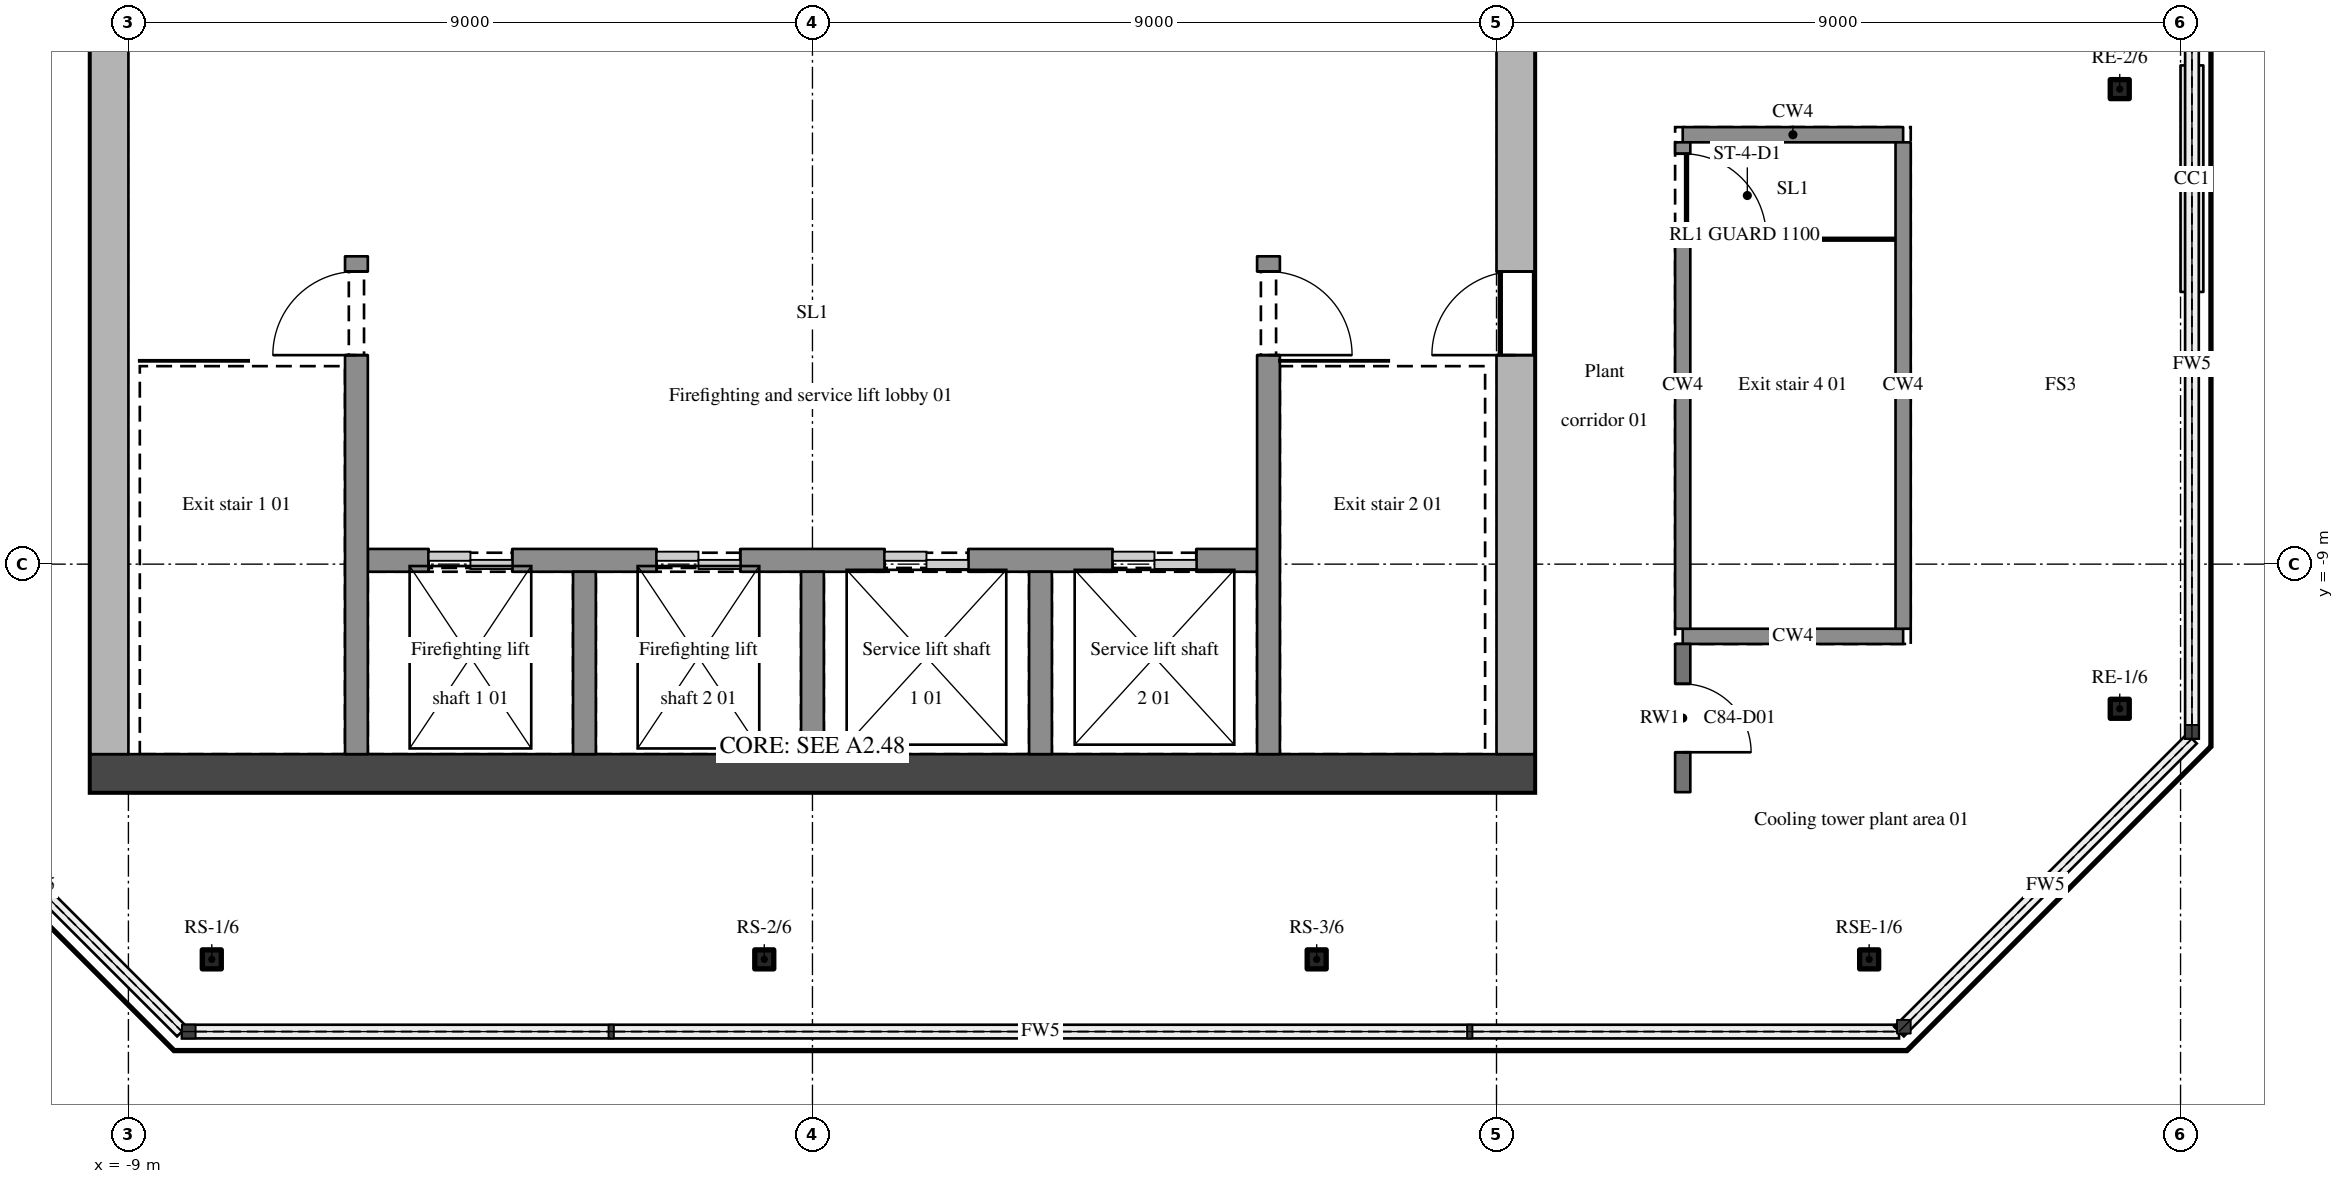
"""IFC4 building model, lengths in metres.
Left out: names, types, materials, properties, quantities, classifications, styles, units other than length and angle.
Written with IfcOpenShell. Run it as: python <this file> out.ifc"""

import sys

from ifc_helpers import new_model, si_unit, direction, frame, frame_2d, origin, origin_2d, place, context, subcontext, project, spatial, polyline, rectangle, hollow_rectangle, outline, extrude, element, fill, save


model = new_model("IFC4")
c1 = context("Model", 3, precision=1e-05, world=origin(), true_north=direction((0.0, 1.0)))
c2 = subcontext(c1, "Body", "Model", "MODEL_VIEW")
j1 = project(units=[si_unit("LENGTHUNIT", "METRE"), si_unit("PLANEANGLEUNIT", "RADIAN")], contexts=[c1])
p1 = place(None, origin())
s1 = spatial("IfcSite", under=j1, at=p1, CompositionType="ELEMENT")
p2 = place(p1, origin())
s2 = spatial("IfcBuilding", under=s1, at=p2, CompositionType="ELEMENT")
p3 = place(p2, frame((0.0, 0.0, 311.7)))
s3 = spatial("IfcBuildingStorey", under=s2, at=p3, CompositionType="ELEMENT", Elevation=311.7)
for number, where, z_axis, x_axis in (
    (1, (-7.903, -14.2, 0.0), (0.0, 0.0, 1.0), (1.0, 0.0, 0.0)),
    (2, (-0.634, -14.2, 0.0), (0.0, 0.0, 1.0), (1.0, 0.0, 0.0)),
    (3, (6.634, -14.2, 0.0), (0.0, 0.0, 1.0), (1.0, 0.0, 0.0)),
    (4, (13.903, -14.2, 0.0), (0.0, 0.0, 1.0), (1.0, 0.0, 0.0)),
    (5, (17.2, -10.903, 0.0), (0.0, 0.0, 1.0), (1.0, 0.0, 0.0)),
):
    element("IfcColumn", number, at=place(p3, frame(where, z_axis=z_axis, x_axis=x_axis)), inside=s3, PredefinedType="COLUMN", context=c2, shape_type="SweptSolid", body=[
        extrude(hollow_rectangle(XDim=0.25, YDim=0.25, WallThickness=0.02, InnerFilletRadius=0.03, OuterFilletRadius=0.05, at=origin_2d()), origin(), (0.0, 0.0, 1.0), 3.6),
    ])
p4 = place(p3, frame((17.2, -2.75, 0.0), z_axis=(0.0, 0.0, 1.0), x_axis=(1.0, 0.0, 0.0)))
e6 = element("IfcColumn", 6, at=p4, inside=s3, PredefinedType="COLUMN", context=c2, shape_type="SweptSolid", body=[
    extrude(hollow_rectangle(XDim=0.25, YDim=0.25, WallThickness=0.02, InnerFilletRadius=0.03, OuterFilletRadius=0.05, at=origin_2d()), origin(), (0.0, 0.0, 1.0), 3.122),
])
p5 = place(p3, frame((-9.5, -11.75, 0.0), z_axis=(0.0, 0.0, 1.0), x_axis=(1.0, 0.0, 0.0)))
e7 = element("IfcWall", 7, at=p5, inside=s3, PredefinedType="SHEAR", context=c2, shape_type="SweptSolid", body=[
    extrude(outline(polyline([(0.0, 0.0), (19.0, 0.0), (19.0, 3.6), (0.0, 3.6), (0.0, 0.0)])), frame((0.0, 0.25, 0.0), z_axis=(0.0, -1.0, 0.0), x_axis=(1.0, 0.0, 0.0)), (0.0, 0.0, 1.0), 0.5),
])
p6 = place(p3, frame((-9.25, -11.5, 0.0), z_axis=(0.0, 0.0, 1.0), x_axis=(0.0, 1.0, 0.0)))
e8 = element("IfcWall", 8, at=p6, inside=s3, PredefinedType="SHEAR", context=c2, shape_type="SweptSolid", body=[
    extrude(outline(polyline([(0.0, 0.0), (11.65, 0.0), (11.65, 0.657), (8.188, 3.6), (0.0, 3.6), (0.0, 0.0)])), frame((0.0, 0.25, 0.0), z_axis=(0.0, -1.0, 0.0), x_axis=(1.0, 0.0, 0.0)), (0.0, 0.0, 1.0), 0.5),
])
p7 = place(p3, frame((9.25, -11.5, 0.0), z_axis=(0.0, 0.0, 1.0), x_axis=(0.0, 1.0, 0.0)))
e9 = element("IfcWall", 9, at=p7, inside=s3, PredefinedType="SHEAR", context=c2, shape_type="SweptSolid", body=[
    extrude(outline(polyline([(0.0, 0.0), (11.65, 0.0), (11.65, 0.657), (8.188, 3.6), (0.0, 3.6), (0.0, 0.0)])), frame((0.0, 0.25, 0.0), z_axis=(0.0, -1.0, 0.0), x_axis=(1.0, 0.0, 0.0)), (0.0, 0.0, 1.0), 0.5),
])
p8 = place(p7, frame((5.25, 0.0, 0.0)))
e10 = element("IfcOpeningElement", 10, at=p8, cuts=e9, PredefinedType="OPENING", context=c2, shape_type="SweptSolid", body=[
    extrude(rectangle(XDim=1.1, YDim=2.1, at=frame_2d((0.55, 1.05))), frame((0.0, 0.26, 0.0), z_axis=(0.0, -1.0, 0.0), x_axis=(1.0, 0.0, 0.0)), (0.0, 0.0, 1.0), 0.52),
])
p9 = place(p3, frame((11.45, -9.95, 0.0), z_axis=(0.0, 0.0, 1.0), x_axis=(1.0, 0.0, 0.0)))
e11 = element("IfcWall", 11, at=p9, inside=s3, PredefinedType="SHEAR", context=c2, shape_type="SweptSolid", body=[
    extrude(rectangle(XDim=2.9, YDim=0.2, at=frame_2d((1.45, 0.0))), origin(), (0.0, 0.0, 1.0), 3.6),
])
p10 = place(p3, frame((-5.85, -8.95, 0.0), z_axis=(0.0, 0.0, 1.0), x_axis=(1.0, 0.0, 0.0)))
e12 = element("IfcWall", 12, at=p10, inside=s3, PredefinedType="SHEAR", context=c2, shape_type="SweptSolid", body=[
    extrude(rectangle(XDim=11.7, YDim=0.3, at=frame_2d((5.85, 0.0))), origin(), (0.0, 0.0, 1.0), 3.6),
])
p11 = place(p10, frame((0.8, 0.0, 0.0)))
e13 = element("IfcOpeningElement", 13, at=p11, cuts=e12, PredefinedType="OPENING", context=c2, shape_type="SweptSolid", body=[
    extrude(rectangle(XDim=1.1, YDim=2.1, at=frame_2d((0.55, 1.05))), frame((0.0, 0.16, 0.0), z_axis=(0.0, -1.0, 0.0), x_axis=(1.0, 0.0, 0.0)), (0.0, 0.0, 1.0), 0.32),
])
p12 = place(p10, frame((3.8, 0.0, 0.0)))
e14 = element("IfcOpeningElement", 14, at=p12, cuts=e12, PredefinedType="OPENING", context=c2, shape_type="SweptSolid", body=[
    extrude(rectangle(XDim=1.1, YDim=2.1, at=frame_2d((0.55, 1.05))), frame((0.0, 0.16, 0.0), z_axis=(0.0, -1.0, 0.0), x_axis=(1.0, 0.0, 0.0)), (0.0, 0.0, 1.0), 0.32),
])
p13 = place(p10, frame((6.8, 0.0, 0.0)))
e15 = element("IfcOpeningElement", 15, at=p13, cuts=e12, PredefinedType="OPENING", context=c2, shape_type="SweptSolid", body=[
    extrude(rectangle(XDim=1.1, YDim=2.1, at=frame_2d((0.55, 1.05))), frame((0.0, 0.16, 0.0), z_axis=(0.0, -1.0, 0.0), x_axis=(1.0, 0.0, 0.0)), (0.0, 0.0, 1.0), 0.32),
])
p14 = place(p10, frame((9.8, 0.0, 0.0)))
e16 = element("IfcOpeningElement", 16, at=p14, cuts=e12, PredefinedType="OPENING", context=c2, shape_type="SweptSolid", body=[
    extrude(rectangle(XDim=1.1, YDim=2.1, at=frame_2d((0.55, 1.05))), frame((0.0, 0.16, 0.0), z_axis=(0.0, -1.0, 0.0), x_axis=(1.0, 0.0, 0.0)), (0.0, 0.0, 1.0), 0.32),
])
p15 = place(p3, frame((11.45, -3.35, 0.0), z_axis=(0.0, 0.0, 1.0), x_axis=(1.0, 0.0, 0.0)))
e17 = element("IfcWall", 17, at=p15, inside=s3, PredefinedType="SHEAR", context=c2, shape_type="SweptSolid", body=[
    extrude(rectangle(XDim=2.9, YDim=0.2, at=frame_2d((1.45, 0.0))), origin(), (0.0, 0.0, 1.0), 3.6),
])
p16 = place(p3, frame((-6.0, -11.5, 0.0), z_axis=(0.0, 0.0, 1.0), x_axis=(0.0, 1.0, 0.0)))
e18 = element("IfcWall", 18, at=p16, inside=s3, PredefinedType="SHEAR", context=c2, shape_type="SweptSolid", body=[
    extrude(rectangle(XDim=6.55, YDim=0.3, at=frame_2d((3.275, 0.0))), origin(), (0.0, 0.0, 1.0), 3.6),
])
p17 = place(p16, frame((5.25, 0.0, 0.0)))
e19 = element("IfcOpeningElement", 19, at=p17, cuts=e18, PredefinedType="OPENING", context=c2, shape_type="SweptSolid", body=[
    extrude(rectangle(XDim=1.1, YDim=2.1, at=frame_2d((0.55, 1.05))), frame((0.0, 0.16, 0.0), z_axis=(0.0, -1.0, 0.0), x_axis=(1.0, 0.0, 0.0)), (0.0, 0.0, 1.0), 0.32),
])
for number, where, z_axis, x_axis in (
    (20, (-3.0, -11.5, 0.0), (0.0, 0.0, 1.0), (0.0, 1.0, 0.0)),
    (21, (0.0, -11.5, 0.0), (0.0, 0.0, 1.0), (0.0, 1.0, 0.0)),
    (22, (3.0, -11.5, 0.0), (0.0, 0.0, 1.0), (0.0, 1.0, 0.0)),
):
    element("IfcWall", number, at=place(p3, frame(where, z_axis=z_axis, x_axis=x_axis)), inside=s3, PredefinedType="SHEAR", context=c2, shape_type="SweptSolid", body=[
        extrude(rectangle(XDim=2.4, YDim=0.3, at=frame_2d((1.2, 0.0))), origin(), (0.0, 0.0, 1.0), 3.6),
    ])
p18 = place(p3, frame((6.0, -4.95, 0.0), z_axis=(0.0, 0.0, 1.0), x_axis=(0.0, -1.0, 0.0)))
e23 = element("IfcWall", 23, at=p18, inside=s3, PredefinedType="SHEAR", context=c2, shape_type="SweptSolid", body=[
    extrude(rectangle(XDim=6.55, YDim=0.3, at=frame_2d((3.275, 0.0))), origin(), (0.0, 0.0, 1.0), 3.6),
])
p19 = place(p18, frame((0.2, 0.0, 0.0)))
e24 = element("IfcOpeningElement", 24, at=p19, cuts=e23, PredefinedType="OPENING", context=c2, shape_type="SweptSolid", body=[
    extrude(rectangle(XDim=1.1, YDim=2.1, at=frame_2d((0.55, 1.05))), frame((0.0, 0.16, 0.0), z_axis=(0.0, -1.0, 0.0), x_axis=(1.0, 0.0, 0.0)), (0.0, 0.0, 1.0), 0.32),
])
p20 = place(p3, frame((11.45, -10.05, 0.0), z_axis=(0.0, 0.0, 1.0), x_axis=(0.0, -1.0, 0.0)))
e25 = element("IfcWall", 25, at=p20, inside=s3, PredefinedType="SOLIDWALL", context=c2, shape_type="SweptSolid", body=[
    extrude(rectangle(XDim=1.95, YDim=0.2, at=frame_2d((0.975, 0.0))), origin(), (0.0, 0.0, 1.0), 2.66),
])
p21 = place(p20, frame((0.525, 0.0, 0.0)))
e26 = element("IfcOpeningElement", 26, at=p21, cuts=e25, PredefinedType="OPENING", context=c2, shape_type="SweptSolid", body=[
    extrude(rectangle(XDim=0.9, YDim=2.1, at=frame_2d((0.45, 1.05))), frame((0.0, 0.11, 0.0), z_axis=(0.0, -1.0, 0.0), x_axis=(1.0, 0.0, 0.0)), (0.0, 0.0, 1.0), 0.22),
])
p22 = place(p3, frame((11.45, -3.45, 0.0), z_axis=(0.0, 0.0, 1.0), x_axis=(0.0, -1.0, 0.0)))
e27 = element("IfcWall", 27, at=p22, inside=s3, PredefinedType="SHEAR", context=c2, shape_type="SweptSolid", body=[
    extrude(rectangle(XDim=6.4, YDim=0.2, at=frame_2d((3.2, 0.0))), origin(), (0.0, 0.0, 1.0), 3.6),
])
p23 = place(p22, frame((0.15, 0.0, 0.0)))
e28 = element("IfcOpeningElement", 28, at=p23, cuts=e27, PredefinedType="OPENING", context=c2, shape_type="SweptSolid", body=[
    extrude(rectangle(XDim=1.1, YDim=2.1, at=frame_2d((0.55, 1.05))), frame((0.0, 0.11, 0.0), z_axis=(0.0, -1.0, 0.0), x_axis=(1.0, 0.0, 0.0)), (0.0, 0.0, 1.0), 0.22),
])
p24 = place(p3, frame((14.35, -9.85, 0.0), z_axis=(0.0, 0.0, 1.0), x_axis=(0.0, 1.0, 0.0)))
e29 = element("IfcWall", 29, at=p24, inside=s3, PredefinedType="SHEAR", context=c2, shape_type="SweptSolid", body=[
    extrude(rectangle(XDim=6.4, YDim=0.2, at=frame_2d((3.2, 0.0))), origin(), (0.0, 0.0, 1.0), 3.6),
])
p25 = place(p17, origin())
e30 = element("IfcDoor", 30, at=p25, inside=s3, OperationType="SINGLE_SWING_LEFT", PredefinedType="DOOR", context=c2, shape_type="SweptSolid", body=[
    extrude(rectangle(XDim=1.1, YDim=2.1, at=frame_2d((0.55, 1.05))), frame((0.0, 0.025, 0.0), z_axis=(0.0, -1.0, 0.0), x_axis=(1.0, 0.0, 0.0)), (0.0, 0.0, 1.0), 0.05),
])
fill(e19, e30)
p26 = place(p19, origin())
e31 = element("IfcDoor", 31, at=p26, inside=s3, OperationType="SINGLE_SWING_RIGHT", PredefinedType="DOOR", context=c2, shape_type="SweptSolid", body=[
    extrude(rectangle(XDim=1.1, YDim=2.1, at=frame_2d((0.55, 1.05))), frame((0.0, 0.025, 0.0), z_axis=(0.0, -1.0, 0.0), x_axis=(1.0, 0.0, 0.0)), (0.0, 0.0, 1.0), 0.05),
])
fill(e24, e31)
p27 = place(p8, origin())
e32 = element("IfcDoor", 32, at=p27, inside=s3, OperationType="SINGLE_SWING_LEFT", PredefinedType="DOOR", context=c2, shape_type="SweptSolid", body=[
    extrude(rectangle(XDim=1.1, YDim=2.1, at=frame_2d((0.55, 1.05))), frame((0.0, 0.025, 0.0), z_axis=(0.0, -1.0, 0.0), x_axis=(1.0, 0.0, 0.0)), (0.0, 0.0, 1.0), 0.05),
])
fill(e10, e32)
p28 = place(p23, origin())
e33 = element("IfcDoor", 33, at=p28, inside=s3, OperationType="SINGLE_SWING_RIGHT", PredefinedType="DOOR", context=c2, shape_type="SweptSolid", body=[
    extrude(rectangle(XDim=1.1, YDim=2.1, at=frame_2d((0.55, 1.05))), frame((0.0, 0.025, 0.0), z_axis=(0.0, -1.0, 0.0), x_axis=(1.0, 0.0, 0.0)), (0.0, 0.0, 1.0), 0.05),
])
fill(e28, e33)
p29 = place(p21, origin())
e34 = element("IfcDoor", 34, at=p29, inside=s3, OperationType="SINGLE_SWING_RIGHT", PredefinedType="DOOR", context=c2, shape_type="SweptSolid", body=[
    extrude(rectangle(XDim=0.9, YDim=2.1, at=frame_2d((0.45, 1.05))), frame((0.0, 0.025, 0.0), z_axis=(0.0, -1.0, 0.0), x_axis=(1.0, 0.0, 0.0)), (0.0, 0.0, 1.0), 0.05),
])
fill(e26, e34)
p30 = place(p11, origin())
e35 = element("IfcDoor", 35, at=p30, inside=s3, OperationType="DOUBLE_DOOR_SLIDING", PredefinedType="DOOR", context=c2, shape_type="SweptSolid", body=[
    extrude(rectangle(XDim=1.1, YDim=2.1, at=frame_2d((0.55, 1.05))), frame((0.0, 0.025, 0.0), z_axis=(0.0, -1.0, 0.0), x_axis=(1.0, 0.0, 0.0)), (0.0, 0.0, 1.0), 0.05),
])
fill(e13, e35)
p31 = place(p12, origin())
e36 = element("IfcDoor", 36, at=p31, inside=s3, OperationType="DOUBLE_DOOR_SLIDING", PredefinedType="DOOR", context=c2, shape_type="SweptSolid", body=[
    extrude(rectangle(XDim=1.1, YDim=2.1, at=frame_2d((0.55, 1.05))), frame((0.0, 0.025, 0.0), z_axis=(0.0, -1.0, 0.0), x_axis=(1.0, 0.0, 0.0)), (0.0, 0.0, 1.0), 0.05),
])
fill(e14, e36)
p32 = place(p13, origin())
e37 = element("IfcDoor", 37, at=p32, inside=s3, OperationType="DOUBLE_DOOR_SLIDING", PredefinedType="DOOR", context=c2, shape_type="SweptSolid", body=[
    extrude(rectangle(XDim=1.1, YDim=2.1, at=frame_2d((0.55, 1.05))), frame((0.0, 0.025, 0.0), z_axis=(0.0, -1.0, 0.0), x_axis=(1.0, 0.0, 0.0)), (0.0, 0.0, 1.0), 0.05),
])
fill(e15, e37)
p33 = place(p14, origin())
e38 = element("IfcDoor", 38, at=p33, inside=s3, OperationType="DOUBLE_DOOR_SLIDING", PredefinedType="DOOR", context=c2, shape_type="SweptSolid", body=[
    extrude(rectangle(XDim=1.1, YDim=2.1, at=frame_2d((0.55, 1.05))), frame((0.0, 0.025, 0.0), z_axis=(0.0, -1.0, 0.0), x_axis=(1.0, 0.0, 0.0)), (0.0, 0.0, 1.0), 0.05),
])
fill(e16, e38)
save(model, sys.argv[1])
